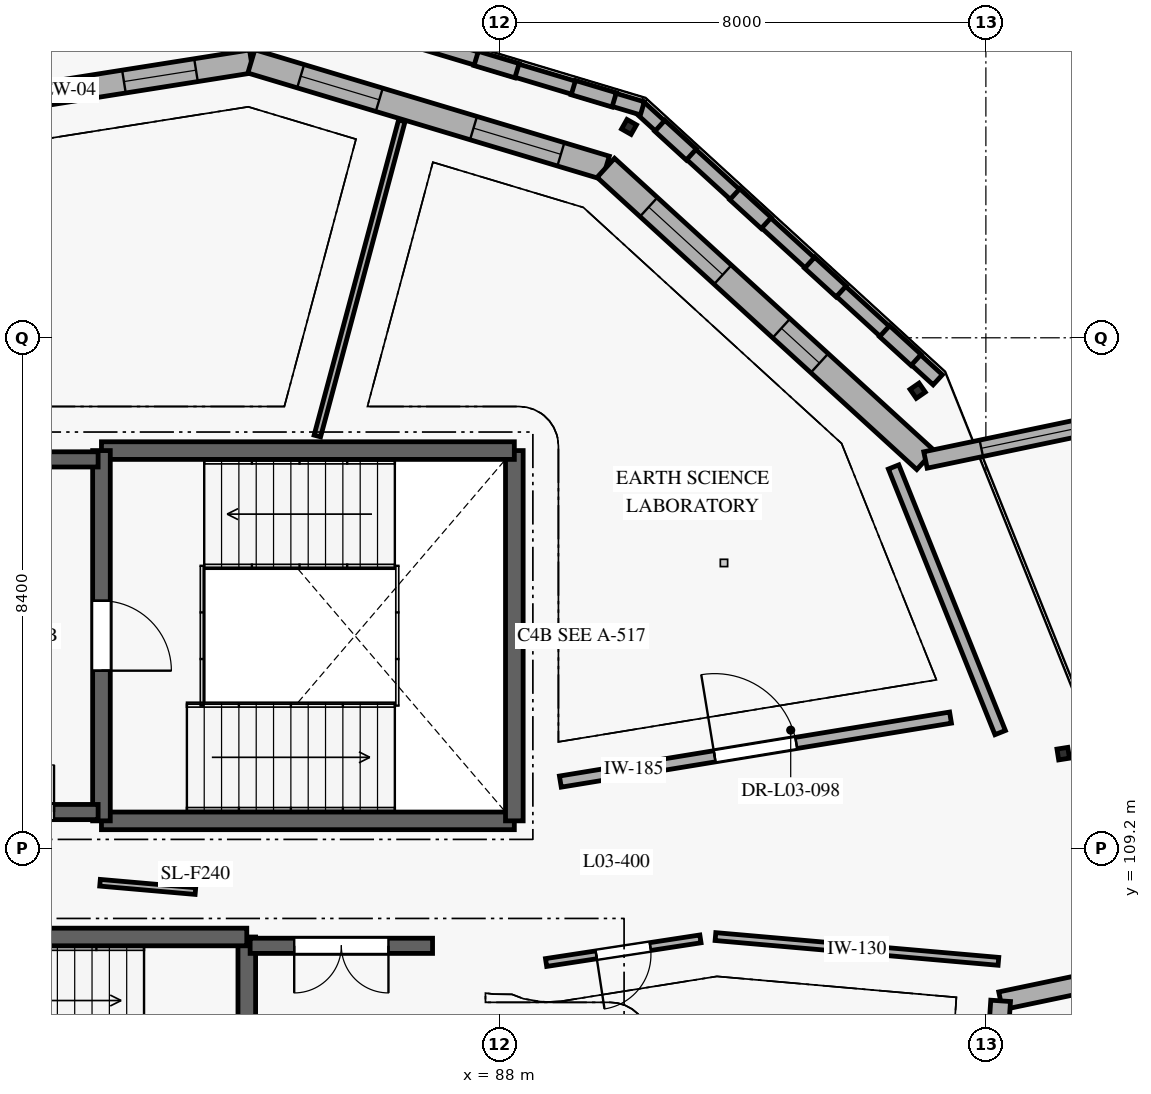
"""IFC4 building model, lengths in metres.
Left out: names, types, materials, properties, quantities, classifications, styles, units other than length and angle.
Written with IfcOpenShell. Run it as: python <this file> out.ifc"""

import sys

from ifc_helpers import new_model, si_unit, direction, frame, frame_2d, origin, origin_2d, place, context, subcontext, project, spatial, rectangle, hollow_rectangle, extrude, element, fill, save


model = new_model("IFC4")
c1 = context("Model", 3, precision=1e-05, world=origin(), true_north=direction((0.0, 1.0)))
c2 = subcontext(c1, "Body", "Model", "MODEL_VIEW")
j1 = project(units=[si_unit("LENGTHUNIT", "METRE"), si_unit("PLANEANGLEUNIT", "RADIAN")], contexts=[c1])
p1 = place(None, origin())
s1 = spatial("IfcSite", under=j1, at=p1, CompositionType="ELEMENT")
p2 = place(p1, origin())
s2 = spatial("IfcBuilding", under=s1, at=p2, CompositionType="ELEMENT")
p3 = place(p2, frame((0.0, 0.0, 12.6)))
s3 = spatial("IfcBuildingStorey", under=s2, at=p3, CompositionType="ELEMENT", Elevation=12.6)
for number, where, z_axis, x_axis in (
    (1, (97.272, 110.76, 0.0), (0.0, 0.0, 1.0), (-0.156, 0.988, 0.0)),
    (2, (94.878, 116.729, 0.0), (0.0, 0.0, 1.0), (-0.569, 0.822, 0.0)),
    (3, (90.131, 121.068, 0.0), (0.0, 0.0, 1.0), (-0.87, 0.493, 0.0)),
):
    element("IfcColumn", number, at=place(p3, frame(where, z_axis=z_axis, x_axis=x_axis)), inside=s3, PredefinedType="PILASTER", context=c2, shape_type="SweptSolid", body=[
        extrude(hollow_rectangle(XDim=0.18, YDim=0.18, WallThickness=0.01, InnerFilletRadius=0.01, OuterFilletRadius=0.015, at=origin_2d()), origin(), (0.0, 0.0, 1.0), 4.2),
    ])
p4 = place(p3, frame((103.532, 108.22, 0.0), z_axis=(0.0, 0.0, 1.0), x_axis=(-0.978786344777, -0.204883604222, 0.0)))
e4 = element("IfcWall", 4, at=p4, inside=s3, PredefinedType="SOLIDWALL", context=c2, shape_type="SweptSolid", body=[
    extrude(rectangle(XDim=7.448, YDim=0.3, at=frame_2d((3.724, 0.0))), origin(), (0.0, 0.0, 1.0), 3.94),
])
p5 = place(p4, frame((0.612, 0.0, 0.85)))
e5 = element("IfcOpeningElement", 5, at=p5, cuts=e4, PredefinedType="OPENING", context=c2, shape_type="SweptSolid", body=[
    extrude(rectangle(XDim=2.5, YDim=1.3, at=frame_2d((1.25, 0.65))), frame((0.0, 0.16, 0.0), z_axis=(0.0, -1.0, 0.0), x_axis=(1.0, 0.0, 0.0)), (0.0, 0.0, 1.0), 0.32),
])
p6 = place(p4, frame((5.011, 0.0, 0.85)))
e6 = element("IfcOpeningElement", 6, at=p6, cuts=e4, PredefinedType="OPENING", context=c2, shape_type="SweptSolid", body=[
    extrude(rectangle(XDim=1.15, YDim=1.5, at=frame_2d((0.575, 0.75))), frame((0.0, 0.16, 0.0), z_axis=(0.0, -1.0, 0.0), x_axis=(1.0, 0.0, 0.0)), (0.0, 0.0, 1.0), 0.32),
])
p7 = place(p3, frame((96.243, 106.695, 0.0), z_axis=(0.0, 0.0, 1.0), x_axis=(-0.067309145793, -0.997732167915, 0.0)))
e7 = element("IfcWall", 7, at=p7, inside=s3, PredefinedType="SOLIDWALL", context=c2, shape_type="SweptSolid", body=[
    extrude(rectangle(XDim=2.133, YDim=0.325, at=frame_2d((1.066, 0.0))), origin(), (0.0, 0.0, 1.0), 3.94),
])
p8 = place(p7, frame((0.366, 0.0, 0.85)))
e8 = element("IfcOpeningElement", 8, at=p8, cuts=e7, PredefinedType="OPENING", context=c2, shape_type="SweptSolid", body=[
    extrude(rectangle(XDim=1.4, YDim=1.5, at=frame_2d((0.7, 0.75))), frame((0.0, 0.172, 0.0), z_axis=(0.0, -1.0, 0.0), x_axis=(1.0, 0.0, 0.0)), (0.0, 0.0, 1.0), 0.345),
])
p9 = place(p3, frame((77.908, 121.194, 0.0), z_axis=(0.0, 0.0, 1.0), x_axis=(0.987690665759, 0.156419783824, 0.0)))
e9 = element("IfcWall", 9, at=p9, inside=s3, PredefinedType="SOLIDWALL", context=c2, shape_type="SweptSolid", body=[
    extrude(rectangle(XDim=6.087, YDim=0.38, at=frame_2d((3.043, 0.0))), origin(), (0.0, 0.0, 1.0), 3.94),
])
p10 = place(p9, frame((0.997, 0.0, 0.85)))
e10 = element("IfcOpeningElement", 10, at=p10, cuts=e9, PredefinedType="OPENING", context=c2, shape_type="SweptSolid", body=[
    extrude(rectangle(XDim=1.05, YDim=1.6, at=frame_2d((0.525, 0.8))), frame((0.0, 0.2, 0.0), z_axis=(0.0, -1.0, 0.0), x_axis=(1.0, 0.0, 0.0)), (0.0, 0.0, 1.0), 0.4),
])
p11 = place(p9, frame((3.965, 0.0, 0.85)))
e11 = element("IfcOpeningElement", 11, at=p11, cuts=e9, PredefinedType="OPENING", context=c2, shape_type="SweptSolid", body=[
    extrude(rectangle(XDim=1.2, YDim=1.6, at=frame_2d((0.6, 0.8))), frame((0.0, 0.2, 0.0), z_axis=(0.0, -1.0, 0.0), x_axis=(1.0, 0.0, 0.0)), (0.0, 0.0, 1.0), 0.4),
])
p12 = place(p3, frame((83.92, 122.146, 0.0), z_axis=(0.0, 0.0, 1.0), x_axis=(0.957750075894, -0.28760179437, 0.0)))
e12 = element("IfcWall", 12, at=p12, inside=s3, PredefinedType="SOLIDWALL", context=c2, shape_type="SweptSolid", body=[
    extrude(rectangle(XDim=6.086, YDim=0.4, at=frame_2d((3.043, 0.0))), origin(), (0.0, 0.0, 1.0), 3.94),
])
p13 = place(p12, frame((0.847, 0.0, 0.85)))
e13 = element("IfcOpeningElement", 13, at=p13, cuts=e12, PredefinedType="OPENING", context=c2, shape_type="SweptSolid", body=[
    extrude(rectangle(XDim=1.35, YDim=1.6, at=frame_2d((0.675, 0.8))), frame((0.0, 0.21, 0.0), z_axis=(0.0, -1.0, 0.0), x_axis=(1.0, 0.0, 0.0)), (0.0, 0.0, 1.0), 0.42),
])
p14 = place(p12, frame((3.815, 0.0, 0.85)))
e14 = element("IfcOpeningElement", 14, at=p14, cuts=e12, PredefinedType="OPENING", context=c2, shape_type="SweptSolid", body=[
    extrude(rectangle(XDim=1.5, YDim=1.6, at=frame_2d((0.75, 0.8))), frame((0.0, 0.21, 0.0), z_axis=(0.0, -1.0, 0.0), x_axis=(1.0, 0.0, 0.0)), (0.0, 0.0, 1.0), 0.42),
])
p15 = place(p3, frame((89.75, 120.396, 0.0), z_axis=(0.0, 0.0, 1.0), x_axis=(0.738102453677, -0.674688645136, 0.0)))
e15 = element("IfcWall", 15, at=p15, inside=s3, PredefinedType="SOLIDWALL", context=c2, shape_type="SweptSolid", body=[
    extrude(rectangle(XDim=7.122, YDim=0.425, at=frame_2d((3.561, 0.0))), origin(), (0.0, 0.0, 1.0), 3.94),
])
p16 = place(p15, frame((0.956, 0.0, 0.85)))
e16 = element("IfcOpeningElement", 16, at=p16, cuts=e15, PredefinedType="OPENING", context=c2, shape_type="SweptSolid", body=[
    extrude(rectangle(XDim=1.65, YDim=1.6, at=frame_2d((0.825, 0.8))), frame((0.0, 0.222, 0.0), z_axis=(0.0, -1.0, 0.0), x_axis=(1.0, 0.0, 0.0)), (0.0, 0.0, 1.0), 0.445),
])
p17 = place(p15, frame((3.911, 0.0, 0.85)))
e17 = element("IfcOpeningElement", 17, at=p17, cuts=e15, PredefinedType="OPENING", context=c2, shape_type="SweptSolid", body=[
    extrude(rectangle(XDim=0.85, YDim=1.4, at=frame_2d((0.425, 0.7))), frame((0.0, 0.222, 0.0), z_axis=(0.0, -1.0, 0.0), x_axis=(1.0, 0.0, 0.0)), (0.0, 0.0, 1.0), 0.445),
])
p18 = place(p3, frame((95.007, 115.59, 0.0), z_axis=(0.0, 0.0, 1.0), x_axis=(0.978789137369, 0.204870262772, 0.0)))
e18 = element("IfcWall", 18, at=p18, inside=s3, PredefinedType="SOLIDWALL", context=c2, shape_type="SweptSolid", body=[
    extrude(rectangle(XDim=7.652, YDim=0.275, at=frame_2d((3.826, 0.0))), origin(), (0.0, 0.0, 1.0), 3.157),
])
p19 = place(p18, frame((0.938, 0.0, 0.85)))
e19 = element("IfcOpeningElement", 19, at=p19, cuts=e18, PredefinedType="OPENING", context=c2, shape_type="SweptSolid", body=[
    extrude(rectangle(XDim=1.95, YDim=1.6, at=frame_2d((0.975, 0.8))), frame((0.0, 0.147, 0.0), z_axis=(0.0, -1.0, 0.0), x_axis=(1.0, 0.0, 0.0)), (0.0, 0.0, 1.0), 0.295),
])
p20 = place(p18, frame((4.689, 0.0, 0.85)))
e20 = element("IfcOpeningElement", 20, at=p20, cuts=e18, PredefinedType="OPENING", context=c2, shape_type="SweptSolid", body=[
    extrude(rectangle(XDim=2.1, YDim=1.6, at=frame_2d((1.05, 0.8))), frame((0.0, 0.147, 0.0), z_axis=(0.0, -1.0, 0.0), x_axis=(1.0, 0.0, 0.0)), (0.0, 0.0, 1.0), 0.295),
])
p21 = place(p3, frame((95.208, 116.909, 0.0), z_axis=(0.0, 0.0, 1.0), x_axis=(-0.738121953815, 0.674667311566, 0.0)))
e21 = element("IfcWall", 21, at=p21, inside=s3, PredefinedType="ELEMENTEDWALL", context=c2, shape_type="SweptSolid", body=[
    extrude(rectangle(XDim=6.675, YDim=0.225, at=frame_2d((3.338, 0.0))), origin(), (0.0, 0.0, 1.0), 1.09),
])
for number, where, z_axis, x_axis in (
    (22, (94.851, 117.236, 1.09), (0.0, 0.0, 1.0), (-0.738, 0.675, 0.0)),
    (23, (93.619, 118.362, 1.09), (0.0, 0.0, 1.0), (-0.738, 0.675, 0.0)),
    (24, (92.388, 119.488, 1.09), (0.0, 0.0, 1.0), (-0.738, 0.675, 0.0)),
    (25, (91.156, 120.614, 1.09), (0.0, 0.0, 1.0), (-0.738, 0.675, 0.0)),
):
    element("IfcWall", number, at=place(p3, frame(where, z_axis=z_axis, x_axis=x_axis)), inside=s3, PredefinedType="ELEMENTEDWALL", context=c2, shape_type="SweptSolid", body=[
        extrude(rectangle(XDim=0.701, YDim=0.245, at=frame_2d((0.351, 0.0))), origin(), (0.0, 0.0, 1.0), 2.85),
    ])
p22 = place(p3, frame((90.351, 121.374, 0.0), z_axis=(0.0, 0.0, 1.0), x_axis=(-0.957749751871, 0.287602873404, 0.0)))
e26 = element("IfcWall", 26, at=p22, inside=s3, PredefinedType="ELEMENTEDWALL", context=c2, shape_type="SweptSolid", body=[
    extrude(rectangle(XDim=6.676, YDim=0.225, at=frame_2d((3.338, 0.0))), origin(), (0.0, 0.0, 1.0), 1.09),
])
for number, where, z_axis, x_axis in (
    (27, (89.887, 121.513, 1.09), (0.0, 0.0, 1.0), (-0.958, 0.288, 0.0)),
    (28, (88.289, 121.993, 1.09), (0.0, 0.0, 1.0), (-0.958, 0.288, 0.0)),
):
    element("IfcWall", number, at=place(p3, frame(where, z_axis=z_axis, x_axis=x_axis)), inside=s3, PredefinedType="ELEMENTEDWALL", context=c2, shape_type="SweptSolid", body=[
        extrude(rectangle(XDim=0.701, YDim=0.245, at=frame_2d((0.351, 0.0))), origin(), (0.0, 0.0, 1.0), 2.85),
    ])
p23 = place(p3, frame((84.037, 123.288, 0.0), z_axis=(0.0, 0.0, 1.0), x_axis=(-0.987690206406, -0.156422684322, 0.0)))
e29 = element("IfcWall", 29, at=p23, inside=s3, PredefinedType="ELEMENTEDWALL", context=c2, shape_type="SweptSolid", body=[
    extrude(rectangle(XDim=6.676, YDim=0.225, at=frame_2d((3.338, 0.0))), origin(), (0.0, 0.0, 1.0), 1.09),
])
p24 = place(p3, frame((83.845, 101.655, 0.0), z_axis=(0.0, 0.0, 1.0), x_axis=(0.0, 1.0, 0.0)))
e30 = element("IfcWall", 30, at=p24, inside=s3, PredefinedType="SHEAR", context=c2, shape_type="SweptSolid", body=[
    extrude(rectangle(XDim=6.09, YDim=0.29, at=frame_2d((3.045, 0.0))), origin(), (0.0, 0.0, 1.0), 3.95),
])
p25 = place(p24, frame((2.47, 0.0, 0.0)))
e31 = element("IfcOpeningElement", 31, at=p25, cuts=e30, PredefinedType="OPENING", context=c2, shape_type="SweptSolid", body=[
    extrude(rectangle(XDim=1.15, YDim=2.1, at=frame_2d((0.575, 1.05))), frame((0.0, 0.155, 0.0), z_axis=(0.0, -1.0, 0.0), x_axis=(1.0, 0.0, 0.0)), (0.0, 0.0, 1.0), 0.31),
])
p26 = place(p3, frame((83.845, 107.745, 0.0), z_axis=(0.0, 0.0, 1.0), x_axis=(-1.0, 0.0, 0.0)))
e32 = element("IfcWall", 32, at=p26, inside=s3, PredefinedType="SHEAR", context=c2, shape_type="SweptSolid", body=[
    extrude(rectangle(XDim=6.79, YDim=0.29, at=frame_2d((3.395, 0.0))), origin(), (0.0, 0.0, 1.0), 3.95),
])
p27 = place(p3, frame((86.9, 107.6, 0.0), z_axis=(0.0, 0.0, 1.0), x_axis=(-1.0, 0.0, 0.0)))
e33 = element("IfcWall", 33, at=p27, inside=s3, PredefinedType="SHEAR", context=c2, shape_type="SweptSolid", body=[
    extrude(rectangle(XDim=3.0, YDim=0.25, at=frame_2d((1.5, 0.0))), origin(), (0.0, 0.0, 1.0), 3.95),
])
p28 = place(p27, frame((0.725, 0.0, 0.0)))
e34 = element("IfcOpeningElement", 34, at=p28, cuts=e33, PredefinedType="OPENING", context=c2, shape_type="SweptSolid", body=[
    extrude(rectangle(XDim=1.55, YDim=2.15, at=frame_2d((0.775, 1.075))), frame((0.0, 0.135, 0.0), z_axis=(0.0, -1.0, 0.0), x_axis=(1.0, 0.0, 0.0)), (0.0, 0.0, 1.0), 0.27),
])
p29 = place(p3, frame((81.455, 109.655, 0.0), z_axis=(0.0, 0.0, 1.0), x_axis=(1.0, 0.0, 0.0)))
e35 = element("IfcWall", 35, at=p29, inside=s3, PredefinedType="SHEAR", context=c2, shape_type="SweptSolid", body=[
    extrude(rectangle(XDim=6.79, YDim=0.29, at=frame_2d((3.395, 0.0))), origin(), (0.0, 0.0, 1.0), 3.95),
])
p30 = place(p3, frame((88.245, 109.655, 0.0), z_axis=(0.0, 0.0, 1.0), x_axis=(0.0, 1.0, 0.0)))
e36 = element("IfcWall", 36, at=p30, inside=s3, PredefinedType="SHEAR", context=c2, shape_type="SweptSolid", body=[
    extrude(rectangle(XDim=6.09, YDim=0.29, at=frame_2d((3.045, 0.0))), origin(), (0.0, 0.0, 1.0), 3.95),
])
p31 = place(p3, frame((88.245, 115.745, 0.0), z_axis=(0.0, 0.0, 1.0), x_axis=(-1.0, 0.0, 0.0)))
e37 = element("IfcWall", 37, at=p31, inside=s3, PredefinedType="SHEAR", context=c2, shape_type="SweptSolid", body=[
    extrude(rectangle(XDim=6.79, YDim=0.29, at=frame_2d((3.395, 0.0))), origin(), (0.0, 0.0, 1.0), 3.95),
])
p32 = place(p3, frame((81.455, 115.745, 0.0), z_axis=(0.0, 0.0, 1.0), x_axis=(0.0, -1.0, 0.0)))
e38 = element("IfcWall", 38, at=p32, inside=s3, PredefinedType="SHEAR", context=c2, shape_type="SweptSolid", body=[
    extrude(rectangle(XDim=6.09, YDim=0.29, at=frame_2d((3.045, 0.0))), origin(), (0.0, 0.0, 1.0), 3.95),
])
p33 = place(p32, frame((2.47, 0.0, 0.0)))
e39 = element("IfcOpeningElement", 39, at=p33, cuts=e38, PredefinedType="OPENING", context=c2, shape_type="SweptSolid", body=[
    extrude(rectangle(XDim=1.15, YDim=2.1, at=frame_2d((0.575, 1.05))), frame((0.0, 0.155, 0.0), z_axis=(0.0, -1.0, 0.0), x_axis=(1.0, 0.0, 0.0)), (0.0, 0.0, 1.0), 0.31),
])
p34 = place(p3, frame((78.4, 109.8, 0.0), z_axis=(0.0, 0.0, 1.0), x_axis=(1.0, 0.0, 0.0)))
e40 = element("IfcWall", 40, at=p34, inside=s3, PredefinedType="SHEAR", context=c2, shape_type="SweptSolid", body=[
    extrude(rectangle(XDim=3.0, YDim=0.25, at=frame_2d((1.5, 0.0))), origin(), (0.0, 0.0, 1.0), 3.95),
])
p35 = place(p34, frame((0.725, 0.0, 0.0)))
e41 = element("IfcOpeningElement", 41, at=p35, cuts=e40, PredefinedType="OPENING", context=c2, shape_type="SweptSolid", body=[
    extrude(rectangle(XDim=1.55, YDim=2.15, at=frame_2d((0.775, 1.075))), frame((0.0, 0.135, 0.0), z_axis=(0.0, -1.0, 0.0), x_axis=(1.0, 0.0, 0.0)), (0.0, 0.0, 1.0), 0.27),
])
p36 = place(p3, frame((81.4, 115.6, 0.0), z_axis=(0.0, 0.0, 1.0), x_axis=(-1.0, 0.0, 0.0)))
e42 = element("IfcWall", 42, at=p36, inside=s3, PredefinedType="SHEAR", context=c2, shape_type="SweptSolid", body=[
    extrude(rectangle(XDim=3.0, YDim=0.25, at=frame_2d((1.5, 0.0))), origin(), (0.0, 0.0, 1.0), 3.95),
])
p37 = place(p3, frame((81.431, 108.637, 0.0), z_axis=(0.0, 0.0, 1.0), x_axis=(0.996196241539, -0.08713809926, 0.0)))
e43 = element("IfcWall", 43, at=p37, inside=s3, PredefinedType="PARTITIONING", context=c2, shape_type="SweptSolid", body=[
    extrude(rectangle(XDim=1.575, YDim=0.11, at=frame_2d((0.787, 0.0))), origin(), (0.0, 0.0, 1.0), 3.94),
])
p38 = place(p3, frame((85.006, 115.985, 0.0), z_axis=(0.0, 0.0, 1.0), x_axis=(0.258806589257, 0.965929163737, 0.0)))
e44 = element("IfcWall", 44, at=p38, inside=s3, PredefinedType="PARTITIONING", context=c2, shape_type="SweptSolid", body=[
    extrude(rectangle(XDim=5.366, YDim=0.11, at=frame_2d((2.683, 0.0))), origin(), (0.0, 0.0, 1.0), 3.94),
])
p39 = place(p3, frame((96.206, 107.344, 0.0), z_axis=(0.0, 0.0, 1.0), x_axis=(-0.996193377134, 0.087170840051, 0.0)))
e45 = element("IfcWall", 45, at=p39, inside=s3, PredefinedType="PARTITIONING", context=c2, shape_type="SweptSolid", body=[
    extrude(rectangle(XDim=4.672, YDim=0.13, at=frame_2d((2.336, 0.0))), origin(), (0.0, 0.0, 1.0), 3.94),
])
p40 = place(p3, frame((91.306, 107.714, 0.0), z_axis=(0.0, 0.0, 1.0), x_axis=(-0.988481340726, -0.151342786539, 0.0)))
e46 = element("IfcWall", 46, at=p40, inside=s3, PredefinedType="PARTITIONING", context=c2, shape_type="SweptSolid", body=[
    extrude(rectangle(XDim=2.568, YDim=0.13, at=frame_2d((1.284, 0.0))), origin(), (0.0, 0.0, 1.0), 3.94),
])
p41 = place(p40, frame((0.834, 0.0, 0.0)))
e47 = element("IfcOpeningElement", 47, at=p41, cuts=e46, PredefinedType="OPENING", context=c2, shape_type="SweptSolid", body=[
    extrude(rectangle(XDim=0.9, YDim=2.05, at=frame_2d((0.45, 1.025))), frame((0.0, 0.075, 0.0), z_axis=(0.0, -1.0, 0.0), x_axis=(1.0, 0.0, 0.0)), (0.0, 0.0, 1.0), 0.15),
])
p42 = place(p3, frame((89.002, 110.301, 0.0), z_axis=(0.0, 0.0, 1.0), x_axis=(0.986819802975, 0.161822978763, 0.0)))
e48 = element("IfcWall", 48, at=p42, inside=s3, PredefinedType="PARTITIONING", context=c2, shape_type="SweptSolid", body=[
    extrude(rectangle(XDim=6.502, YDim=0.185, at=frame_2d((3.251, 0.0))), origin(), (0.0, 0.0, 1.0), 3.94),
])
p43 = place(p42, frame((2.571, 0.0, 0.0)))
e49 = element("IfcOpeningElement", 49, at=p43, cuts=e48, PredefinedType="OPENING", context=c2, shape_type="SweptSolid", body=[
    extrude(rectangle(XDim=1.36, YDim=2.14, at=frame_2d((0.68, 1.07))), frame((0.0, 0.103, 0.0), z_axis=(0.0, -1.0, 0.0), x_axis=(1.0, 0.0, 0.0)), (0.0, 0.0, 1.0), 0.205),
])
p44 = place(p3, frame((96.235, 111.106, 0.0), z_axis=(0.0, 0.0, 1.0), x_axis=(-0.37231147683, 0.928107840835, 0.0)))
e50 = element("IfcWall", 50, at=p44, inside=s3, PredefinedType="PARTITIONING", context=c2, shape_type="SweptSolid", body=[
    extrude(rectangle(XDim=4.708, YDim=0.185, at=frame_2d((2.354, 0.0))), origin(), (0.0, 0.0, 1.0), 3.94),
])
p45 = place(p11, origin())
e51 = element("IfcWindow", 51, at=p45, inside=s3, PartitioningType="SINGLE_PANEL", PredefinedType="WINDOW", context=c2, shape_type="SweptSolid", body=[
    extrude(rectangle(XDim=1.2, YDim=1.6, at=frame_2d((0.6, 0.8))), frame((0.0, 0.03, 0.0), z_axis=(0.0, -1.0, 0.0), x_axis=(1.0, 0.0, 0.0)), (0.0, 0.0, 1.0), 0.06),
])
fill(e11, e51)
p46 = place(p13, origin())
e52 = element("IfcWindow", 52, at=p46, inside=s3, PartitioningType="SINGLE_PANEL", PredefinedType="WINDOW", context=c2, shape_type="SweptSolid", body=[
    extrude(rectangle(XDim=1.35, YDim=1.6, at=frame_2d((0.675, 0.8))), frame((0.0, 0.03, 0.0), z_axis=(0.0, -1.0, 0.0), x_axis=(1.0, 0.0, 0.0)), (0.0, 0.0, 1.0), 0.06),
])
fill(e13, e52)
p47 = place(p14, origin())
e53 = element("IfcWindow", 53, at=p47, inside=s3, PartitioningType="SINGLE_PANEL", PredefinedType="WINDOW", context=c2, shape_type="SweptSolid", body=[
    extrude(rectangle(XDim=1.5, YDim=1.6, at=frame_2d((0.75, 0.8))), frame((0.0, 0.03, 0.0), z_axis=(0.0, -1.0, 0.0), x_axis=(1.0, 0.0, 0.0)), (0.0, 0.0, 1.0), 0.06),
])
fill(e14, e53)
p48 = place(p16, origin())
e54 = element("IfcWindow", 54, at=p48, inside=s3, PartitioningType="SINGLE_PANEL", PredefinedType="WINDOW", context=c2, shape_type="SweptSolid", body=[
    extrude(rectangle(XDim=1.65, YDim=1.6, at=frame_2d((0.825, 0.8))), frame((0.0, 0.03, 0.0), z_axis=(0.0, -1.0, 0.0), x_axis=(1.0, 0.0, 0.0)), (0.0, 0.0, 1.0), 0.06),
])
fill(e16, e54)
p49 = place(p17, origin())
e55 = element("IfcWindow", 55, at=p49, inside=s3, PartitioningType="SINGLE_PANEL", PredefinedType="WINDOW", context=c2, shape_type="SweptSolid", body=[
    extrude(rectangle(XDim=0.85, YDim=1.4, at=frame_2d((0.425, 0.7))), frame((0.0, 0.03, 0.0), z_axis=(0.0, -1.0, 0.0), x_axis=(1.0, 0.0, 0.0)), (0.0, 0.0, 1.0), 0.06),
])
fill(e17, e55)
p50 = place(p19, origin())
e56 = element("IfcWindow", 56, at=p50, inside=s3, PartitioningType="SINGLE_PANEL", PredefinedType="WINDOW", context=c2, shape_type="SweptSolid", body=[
    extrude(rectangle(XDim=1.95, YDim=1.6, at=frame_2d((0.975, 0.8))), frame((0.0, 0.03, 0.0), z_axis=(0.0, -1.0, 0.0), x_axis=(1.0, 0.0, 0.0)), (0.0, 0.0, 1.0), 0.06),
])
fill(e19, e56)
p51 = place(p28, origin())
e57 = element("IfcDoor", 57, at=p51, inside=s3, OperationType="DOUBLE_DOOR_SINGLE_SWING", PredefinedType="DOOR", context=c2, shape_type="SweptSolid", body=[
    extrude(rectangle(XDim=1.55, YDim=2.15, at=frame_2d((0.775, 1.075))), frame((0.0, 0.025, 0.0), z_axis=(0.0, -1.0, 0.0), x_axis=(1.0, 0.0, 0.0)), (0.0, 0.0, 1.0), 0.05),
])
fill(e34, e57)
p52 = place(p33, origin())
e58 = element("IfcDoor", 58, at=p52, inside=s3, OperationType="SINGLE_SWING_RIGHT", PredefinedType="DOOR", context=c2, shape_type="SweptSolid", body=[
    extrude(rectangle(XDim=1.15, YDim=2.1, at=frame_2d((0.575, 1.05))), frame((0.0, 0.025, 0.0), z_axis=(0.0, -1.0, 0.0), x_axis=(1.0, 0.0, 0.0)), (0.0, 0.0, 1.0), 0.05),
])
fill(e39, e58)
p53 = place(p35, origin())
e59 = element("IfcDoor", 59, at=p53, inside=s3, OperationType="DOUBLE_DOOR_SINGLE_SWING", PredefinedType="DOOR", context=c2, shape_type="SweptSolid", body=[
    extrude(rectangle(XDim=1.55, YDim=2.15, at=frame_2d((0.775, 1.075))), frame((0.0, 0.025, 0.0), z_axis=(0.0, -1.0, 0.0), x_axis=(1.0, 0.0, 0.0)), (0.0, 0.0, 1.0), 0.05),
])
fill(e41, e59)
p54 = place(p41, origin())
e60 = element("IfcDoor", 60, at=p54, inside=s3, OperationType="SINGLE_SWING_RIGHT", PredefinedType="DOOR", context=c2, shape_type="SweptSolid", body=[
    extrude(rectangle(XDim=0.9, YDim=2.05, at=frame_2d((0.45, 1.025))), frame((0.0, 0.025, 0.0), z_axis=(0.0, -1.0, 0.0), x_axis=(1.0, 0.0, 0.0)), (0.0, 0.0, 1.0), 0.05),
])
fill(e47, e60)
p55 = place(p43, origin())
e61 = element("IfcDoor", 61, at=p55, inside=s3, OperationType="SINGLE_SWING_LEFT", PredefinedType="DOOR", context=c2, shape_type="SweptSolid", body=[
    extrude(rectangle(XDim=1.36, YDim=2.14, at=frame_2d((0.68, 1.07))), frame((0.0, 0.025, 0.0), z_axis=(0.0, -1.0, 0.0), x_axis=(1.0, 0.0, 0.0)), (0.0, 0.0, 1.0), 0.05),
])
fill(e49, e61)
save(model, sys.argv[1])
